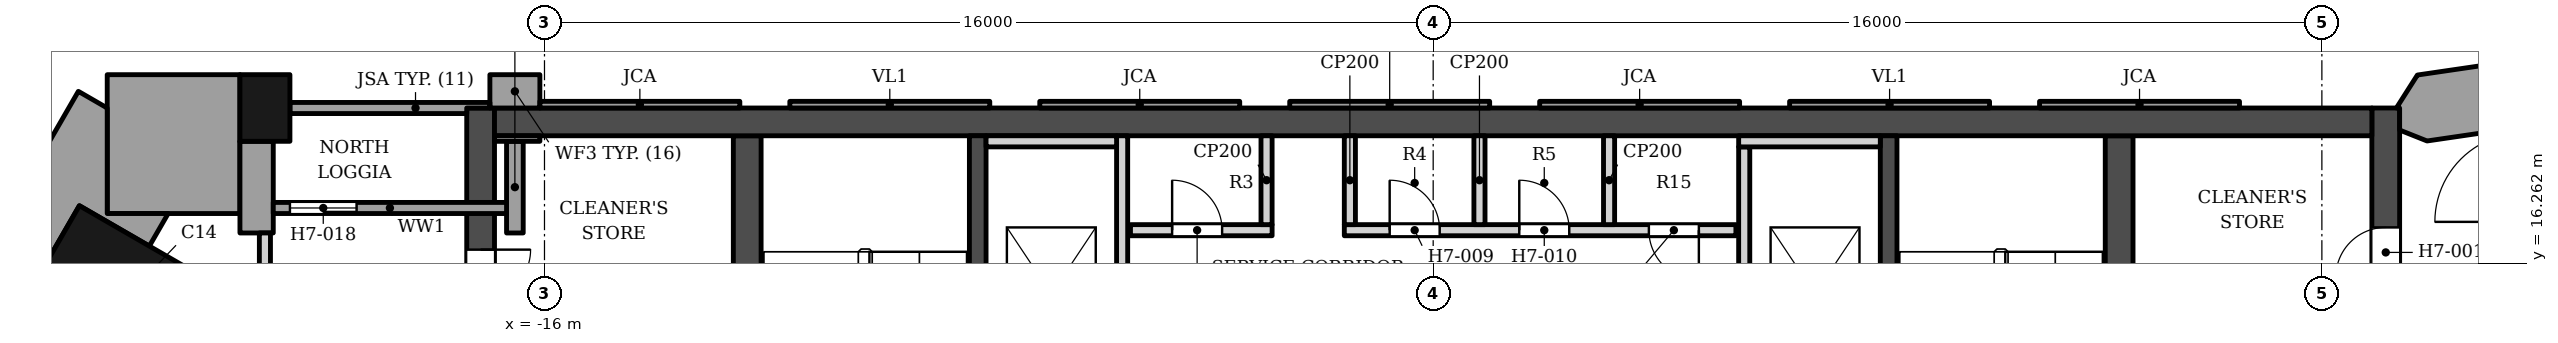
"""IFC4 building model, lengths in metres.
Left out: names, types, materials, properties, quantities, classifications, styles, units other than length and angle.
Written with IfcOpenShell. Run it as: python <this file> out.ifc"""

import sys

from ifc_helpers import new_model, si_unit, direction, frame, frame_2d, origin, origin_2d, place, context, subcontext, project, spatial, polyline, rectangle, outline, extrude, element, fill, save


model = new_model("IFC4")
c1 = context("Model", 3, precision=1e-05, world=origin(), true_north=direction((0.0, 1.0)))
c2 = subcontext(c1, "Body", "Model", "MODEL_VIEW")
j1 = project(units=[si_unit("LENGTHUNIT", "METRE"), si_unit("PLANEANGLEUNIT", "RADIAN")], contexts=[c1])
p1 = place(None, origin())
s1 = spatial("IfcSite", under=j1, at=p1, CompositionType="ELEMENT")
p2 = place(p1, origin())
s2 = spatial("IfcBuilding", under=s1, at=p2, CompositionType="ELEMENT")
p3 = place(p2, frame((0.0, 0.0, 112.2)))
s3 = spatial("IfcBuildingStorey", under=s2, at=p3, CompositionType="ELEMENT", Elevation=112.2)
p4 = place(p3, frame((-16.9, 18.802, 0.0), z_axis=(0.0, 0.0, 1.0), x_axis=(1.0, 0.0, 0.0)))
e1 = element("IfcWall", 1, at=p4, inside=s3, PredefinedType="SHEAR", context=c2, shape_type="SweptSolid", body=[
    extrude(rectangle(XDim=33.8, YDim=0.5, at=frame_2d((16.9, 0.0))), origin(), (0.0, 0.0, 1.0), 3.4),
])
p5 = place(p3, frame((-12.35, 5.253, 0.0), z_axis=(0.0, 0.0, 1.0), x_axis=(0.0, 1.0, 0.0)))
e2 = element("IfcWall", 2, at=p5, inside=s3, PredefinedType="SHEAR", context=c2, shape_type="SweptSolid", body=[
    extrude(rectangle(XDim=13.3, YDim=0.5, at=frame_2d((6.65, 0.0))), origin(), (0.0, 0.0, 1.0), 3.4),
])
p6 = place(p3, frame((-8.2, 5.253, 0.0), z_axis=(0.0, 0.0, 1.0), x_axis=(0.0, 1.0, 0.0)))
e3 = element("IfcWall", 3, at=p6, inside=s3, PredefinedType="SHEAR", context=c2, shape_type="SweptSolid", body=[
    extrude(rectangle(XDim=13.3, YDim=0.3, at=frame_2d((6.65, 0.0))), origin(), (0.0, 0.0, 1.0), 3.4),
])
p7 = place(p6, frame((7.1, 0.0, 0.0)))
e4 = element("IfcOpeningElement", 4, at=p7, cuts=e3, PredefinedType="OPENING", context=c2, shape_type="SweptSolid", body=[
    extrude(rectangle(XDim=1.4, YDim=2.1, at=frame_2d((0.7, 1.05))), frame((0.0, 0.16, 0.0), z_axis=(0.0, -1.0, 0.0), x_axis=(1.0, 0.0, 0.0)), (0.0, 0.0, 1.0), 0.32),
])
p8 = place(p6, frame((5.05, 0.0, 0.0)))
e5 = element("IfcOpeningElement", 5, at=p8, cuts=e3, PredefinedType="OPENING", context=c2, shape_type="SweptSolid", body=[
    extrude(rectangle(XDim=1.4, YDim=2.1, at=frame_2d((0.7, 1.05))), frame((0.0, 0.16, 0.0), z_axis=(0.0, -1.0, 0.0), x_axis=(1.0, 0.0, 0.0)), (0.0, 0.0, 1.0), 0.32),
])
p9 = place(p3, frame((12.35, 5.253, 0.0), z_axis=(0.0, 0.0, 1.0), x_axis=(0.0, 1.0, 0.0)))
e6 = element("IfcWall", 6, at=p9, inside=s3, PredefinedType="SHEAR", context=c2, shape_type="SweptSolid", body=[
    extrude(rectangle(XDim=13.3, YDim=0.5, at=frame_2d((6.65, 0.0))), origin(), (0.0, 0.0, 1.0), 3.4),
])
p10 = place(p3, frame((8.2, 5.253, 0.0), z_axis=(0.0, 0.0, 1.0), x_axis=(0.0, 1.0, 0.0)))
e7 = element("IfcWall", 7, at=p10, inside=s3, PredefinedType="SHEAR", context=c2, shape_type="SweptSolid", body=[
    extrude(rectangle(XDim=13.3, YDim=0.3, at=frame_2d((6.65, 0.0))), origin(), (0.0, 0.0, 1.0), 3.4),
])
p11 = place(p10, frame((7.1, 0.0, 0.0)))
e8 = element("IfcOpeningElement", 8, at=p11, cuts=e7, PredefinedType="OPENING", context=c2, shape_type="SweptSolid", body=[
    extrude(rectangle(XDim=1.4, YDim=2.1, at=frame_2d((0.7, 1.05))), frame((0.0, 0.16, 0.0), z_axis=(0.0, -1.0, 0.0), x_axis=(1.0, 0.0, 0.0)), (0.0, 0.0, 1.0), 0.32),
])
p12 = place(p10, frame((5.05, 0.0, 0.0)))
e9 = element("IfcOpeningElement", 9, at=p12, cuts=e7, PredefinedType="OPENING", context=c2, shape_type="SweptSolid", body=[
    extrude(rectangle(XDim=1.4, YDim=2.1, at=frame_2d((0.7, 1.05))), frame((0.0, 0.16, 0.0), z_axis=(0.0, -1.0, 0.0), x_axis=(1.0, 0.0, 0.0)), (0.0, 0.0, 1.0), 0.32),
])
p13 = place(p3, frame((-17.15, 5.853, 0.0), z_axis=(0.0, 0.0, 1.0), x_axis=(0.0, 1.0, 0.0)))
e10 = element("IfcWall", 10, at=p13, inside=s3, PredefinedType="SHEAR", context=c2, shape_type="SweptSolid", body=[
    extrude(rectangle(XDim=13.2, YDim=0.5, at=frame_2d((6.6, 0.0))), origin(), (0.0, 0.0, 1.0), 3.4),
])
p14 = place(p13, frame((4.1, 0.0, 0.0)))
e11 = element("IfcOpeningElement", 11, at=p14, cuts=e10, PredefinedType="OPENING", context=c2, shape_type="SweptSolid", body=[
    extrude(rectangle(XDim=1.6, YDim=2.1, at=frame_2d((0.8, 1.05))), frame((0.0, 0.26, 0.0), z_axis=(0.0, -1.0, 0.0), x_axis=(1.0, 0.0, 0.0)), (0.0, 0.0, 1.0), 0.52),
])
p15 = place(p13, frame((9.75, 0.0, 0.0)))
e12 = element("IfcOpeningElement", 12, at=p15, cuts=e10, PredefinedType="OPENING", context=c2, shape_type="SweptSolid", body=[
    extrude(rectangle(XDim=0.9, YDim=2.1, at=frame_2d((0.45, 1.05))), frame((0.0, 0.26, 0.0), z_axis=(0.0, -1.0, 0.0), x_axis=(1.0, 0.0, 0.0)), (0.0, 0.0, 1.0), 0.52),
])
p16 = place(p3, frame((17.15, 5.853, 0.0), z_axis=(0.0, 0.0, 1.0), x_axis=(0.0, 1.0, 0.0)))
e13 = element("IfcWall", 13, at=p16, inside=s3, PredefinedType="SHEAR", context=c2, shape_type="SweptSolid", body=[
    extrude(rectangle(XDim=13.2, YDim=0.5, at=frame_2d((6.6, 0.0))), origin(), (0.0, 0.0, 1.0), 3.4),
])
p17 = place(p16, frame((4.1, 0.0, 0.0)))
e14 = element("IfcOpeningElement", 14, at=p17, cuts=e13, PredefinedType="OPENING", context=c2, shape_type="SweptSolid", body=[
    extrude(rectangle(XDim=1.6, YDim=2.1, at=frame_2d((0.8, 1.05))), frame((0.0, 0.26, 0.0), z_axis=(0.0, -1.0, 0.0), x_axis=(1.0, 0.0, 0.0)), (0.0, 0.0, 1.0), 0.52),
])
p18 = place(p16, frame((10.15, 0.0, 0.0)))
e15 = element("IfcOpeningElement", 15, at=p18, cuts=e13, PredefinedType="OPENING", context=c2, shape_type="SweptSolid", body=[
    extrude(rectangle(XDim=0.9, YDim=2.1, at=frame_2d((0.45, 1.05))), frame((0.0, 0.26, 0.0), z_axis=(0.0, -1.0, 0.0), x_axis=(1.0, 0.0, 0.0)), (0.0, 0.0, 1.0), 0.52),
])
p19 = place(p3, frame((-23.843, 15.313, 0.0), z_axis=(0.0, 0.0, 1.0), x_axis=(0.866025377604, -0.500000045345, 0.0)))
e16 = element("IfcColumn", 16, at=p19, inside=s3, PredefinedType="COLUMN", context=c2, shape_type="SweptSolid", body=[
    extrude(rectangle(XDim=2.9, YDim=2.9, at=origin_2d()), origin(), (0.0, 0.0, 1.0), 3.4),
])
p20 = place(p3, frame((-21.033, 19.053, 0.0), z_axis=(0.0, 0.0, 1.0), x_axis=(-1.0, 0.0, 0.0)))
e17 = element("IfcColumn", 17, at=p20, inside=s3, PredefinedType="COLUMN", context=c2, shape_type="SweptSolid", body=[
    extrude(rectangle(XDim=0.9, YDim=1.2, at=origin_2d()), origin(), (0.0, 0.0, 1.0), 3.4),
])
p21 = place(p3, origin())
e18 = element("IfcWall", 18, at=p21, inside=s3, PredefinedType="SOLIDWALL", context=c2, shape_type="SweptSolid", body=[
    extrude(outline(polyline([(-16.083, 19.052), (-16.083, 19.653), (-16.983, 19.653), (-16.983, 19.052), (-16.083, 19.052)])), origin(), (0.0, 0.0, 1.0), 2.65),
])
p22 = place(p3, origin())
e19 = element("IfcWall", 19, at=p22, inside=s3, PredefinedType="SOLIDWALL", context=c2, shape_type="SweptSolid", body=[
    extrude(outline(polyline([(-16.083, 18.453), (-16.083, 18.552), (-16.9, 18.552), (-16.9, 18.453), (-16.083, 18.453)])), origin(), (0.0, 0.0, 1.0), 2.65),
])
p23 = place(p3, origin())
e20 = element("IfcWall", 20, at=p23, inside=s3, PredefinedType="SOLIDWALL", context=c2, shape_type="SweptSolid", body=[
    extrude(outline(polyline([(-16.383, 16.802), (-16.383, 18.453), (-16.683, 18.453), (-16.683, 16.802), (-16.383, 16.802)])), origin(), (0.0, 0.0, 1.0), 2.65),
])
p24 = place(p3, origin())
e21 = element("IfcWall", 21, at=p24, inside=s3, PredefinedType="SOLIDWALL", context=c2, shape_type="SweptSolid", body=[
    extrude(outline(polyline([(-21.483, 18.453), (-21.483, 16.802), (-20.883, 16.802), (-20.883, 18.453), (-21.483, 18.453)])), origin(), (0.0, 0.0, 1.0), 2.63),
])
p25 = place(p3, origin())
e22 = element("IfcWall", 22, at=p25, inside=s3, PredefinedType="SOLIDWALL", context=c2, shape_type="SweptSolid", body=[
    extrude(outline(polyline([(10.917, 19.173), (10.917, 19.052), (14.517, 19.052), (14.517, 19.173), (10.917, 19.173)])), origin(), (0.0, 0.0, 1.0), 2.65),
])
p26 = place(p3, origin())
e23 = element("IfcWall", 23, at=p26, inside=s3, PredefinedType="ELEMENTEDWALL", context=c2, shape_type="SweptSolid", body=[
    extrude(outline(polyline([(6.417, 19.173), (6.417, 19.052), (10.017, 19.052), (10.017, 19.173), (6.417, 19.173)])), origin(), (0.0, 0.0, 1.0), 2.65),
])
p27 = place(p3, origin())
e24 = element("IfcWall", 24, at=p27, inside=s3, PredefinedType="SOLIDWALL", context=c2, shape_type="SweptSolid", body=[
    extrude(outline(polyline([(1.917, 19.173), (1.917, 19.052), (5.517, 19.052), (5.517, 19.173), (1.917, 19.173)])), origin(), (0.0, 0.0, 1.0), 2.65),
])
p28 = place(p3, origin())
e25 = element("IfcWall", 25, at=p28, inside=s3, PredefinedType="ELEMENTEDWALL", context=c2, shape_type="SweptSolid", body=[
    extrude(outline(polyline([(-2.583, 19.173), (-2.583, 19.052), (1.017, 19.052), (1.017, 19.173), (-2.583, 19.173)])), origin(), (0.0, 0.0, 1.0), 2.65),
])
p29 = place(p3, origin())
e26 = element("IfcWall", 26, at=p29, inside=s3, PredefinedType="SOLIDWALL", context=c2, shape_type="SweptSolid", body=[
    extrude(outline(polyline([(-7.083, 19.173), (-7.083, 19.052), (-3.483, 19.052), (-3.483, 19.173), (-7.083, 19.173)])), origin(), (0.0, 0.0, 1.0), 2.65),
])
p30 = place(p3, origin())
e27 = element("IfcWall", 27, at=p30, inside=s3, PredefinedType="ELEMENTEDWALL", context=c2, shape_type="SweptSolid", body=[
    extrude(outline(polyline([(-11.583, 19.173), (-11.583, 19.052), (-7.983, 19.052), (-7.983, 19.173), (-11.583, 19.173)])), origin(), (0.0, 0.0, 1.0), 2.65),
])
p31 = place(p3, origin())
e28 = element("IfcWall", 28, at=p31, inside=s3, PredefinedType="SOLIDWALL", context=c2, shape_type="SweptSolid", body=[
    extrude(outline(polyline([(-16.083, 19.173), (-16.083, 19.052), (-12.483, 19.052), (-12.483, 19.173), (-16.083, 19.173)])), origin(), (0.0, 0.0, 1.0), 2.65),
])
p32 = place(p3, origin())
e29 = element("IfcWall", 29, at=p32, inside=s3, PredefinedType="SOLIDWALL", context=c2, shape_type="SweptSolid", body=[
    extrude(outline(polyline([(-20.583, 19.153), (-20.583, 18.953), (-17.4, 18.953), (-17.4, 19.052), (-16.983, 19.052), (-16.983, 19.153), (-20.583, 19.153)])), origin(), (0.0, 0.0, 1.0), 2.65),
])
p33 = place(p3, frame((-16.683, 17.252, 0.0), z_axis=(0.0, 0.0, 1.0), x_axis=(-1.0, 0.0, 0.0)))
e30 = element("IfcWall", 30, at=p33, inside=s3, PredefinedType="ELEMENTEDWALL", context=c2, shape_type="SweptSolid", body=[
    extrude(rectangle(XDim=4.2, YDim=0.2, at=frame_2d((2.1, 0.0))), origin(), (0.0, 0.0, 1.0), 2.65),
])
p34 = place(p33, frame((2.7, 0.0, 0.0)))
e31 = element("IfcOpeningElement", 31, at=p34, cuts=e30, PredefinedType="OPENING", context=c2, shape_type="SweptSolid", body=[
    extrude(rectangle(XDim=1.2, YDim=2.4, at=frame_2d((0.6, 1.2))), frame((0.0, 0.11, 0.0), z_axis=(0.0, -1.0, 0.0), x_axis=(1.0, 0.0, 0.0)), (0.0, 0.0, 1.0), 0.22),
])
p35 = place(p3, origin())
e32 = element("IfcWall", 32, at=p35, inside=s3, PredefinedType="SOLIDWALL", context=c2, shape_type="SweptSolid", body=[
    extrude(outline(polyline([(-23.873, 17.153), (-21.483, 17.153), (-21.483, 18.453), (-21.483, 18.453), (-21.483, 19.653), (-23.873, 19.653), (-23.873, 17.153)])), origin(), (0.0, 0.0, 1.0), 2.63),
])
p36 = place(p3, origin())
e33 = element("IfcWall", 33, at=p36, inside=s3, PredefinedType="SOLIDWALL", context=c2, shape_type="SweptSolid", body=[
    extrude(outline(polyline([(-23.114, 16.566), (-22.776, 17.153), (-23.873, 17.153), (-23.873, 19.052), (-24.392, 19.353), (-27.616, 13.768), (-25.451, 12.518), (-24.564, 14.055), (-25.824, 14.782), (-24.374, 17.294), (-23.114, 16.566)])), origin(), (0.0, 0.0, 1.0), 2.63),
])
p37 = place(p3, origin())
e34 = element("IfcWall", 34, at=p37, inside=s3, PredefinedType="SOLIDWALL", context=c2, shape_type="SweptSolid", body=[
    extrude(outline(polyline([(17.72, 19.646), (17.342, 19.052), (17.4, 19.052), (17.4, 18.656), (17.894, 18.459), (19.261, 18.659), (19.087, 19.847), (17.72, 19.646)])), origin(), (0.0, 0.0, 1.0), 2.65),
])
p38 = place(p3, frame((-5.6, 14.253, 0.0), z_axis=(0.0, 0.0, 1.0), x_axis=(0.0, 1.0, 0.0)))
e35 = element("IfcWall", 35, at=p38, inside=s3, PredefinedType="SOLIDWALL", context=c2, shape_type="SweptSolid", body=[
    extrude(rectangle(XDim=4.3, YDim=0.2, at=frame_2d((2.15, 0.0))), origin(), (0.0, 0.0, 1.0), 3.23),
])
p39 = place(p3, frame((5.6, 15.453, 0.0), z_axis=(0.0, 0.0, 1.0), x_axis=(0.0, 1.0, 0.0)))
e36 = element("IfcWall", 36, at=p39, inside=s3, PredefinedType="SOLIDWALL", context=c2, shape_type="SweptSolid", body=[
    extrude(rectangle(XDim=2.9, YDim=0.2, at=frame_2d((1.45, 0.0))), origin(), (0.0, 0.0, 1.0), 3.23),
])
p40 = place(p3, frame((-5.45, 16.853, 0.0), z_axis=(0.0, 0.0, 1.0), x_axis=(1.0, 0.0, 0.0)))
e37 = element("IfcWall", 37, at=p40, inside=s3, PredefinedType="SOLIDWALL", context=c2, shape_type="SweptSolid", body=[
    extrude(rectangle(XDim=2.55, YDim=0.2, at=frame_2d((1.275, 0.0))), origin(), (0.0, 0.0, 1.0), 3.23),
])
p41 = place(p40, frame((0.75, 0.0, 0.0)))
e38 = element("IfcOpeningElement", 38, at=p41, cuts=e37, PredefinedType="OPENING", context=c2, shape_type="SweptSolid", body=[
    extrude(rectangle(XDim=0.9, YDim=2.1, at=frame_2d((0.45, 1.05))), frame((0.0, 0.11, 0.0), z_axis=(0.0, -1.0, 0.0), x_axis=(1.0, 0.0, 0.0)), (0.0, 0.0, 1.0), 0.22),
])
p42 = place(p3, frame((-1.6, 16.853, 0.0), z_axis=(0.0, 0.0, 1.0), x_axis=(1.0, 0.0, 0.0)))
e39 = element("IfcWall", 39, at=p42, inside=s3, PredefinedType="SOLIDWALL", context=c2, shape_type="SweptSolid", body=[
    extrude(rectangle(XDim=7.05, YDim=0.2, at=frame_2d((3.525, 0.0))), origin(), (0.0, 0.0, 1.0), 3.23),
])
p43 = place(p42, frame((0.817, 0.0, 0.0)))
e40 = element("IfcOpeningElement", 40, at=p43, cuts=e39, PredefinedType="OPENING", context=c2, shape_type="SweptSolid", body=[
    extrude(rectangle(XDim=0.9, YDim=2.1, at=frame_2d((0.45, 1.05))), frame((0.0, 0.11, 0.0), z_axis=(0.0, -1.0, 0.0), x_axis=(1.0, 0.0, 0.0)), (0.0, 0.0, 1.0), 0.22),
])
p44 = place(p42, frame((3.15, 0.0, 0.0)))
e41 = element("IfcOpeningElement", 41, at=p44, cuts=e39, PredefinedType="OPENING", context=c2, shape_type="SweptSolid", body=[
    extrude(rectangle(XDim=0.9, YDim=2.1, at=frame_2d((0.45, 1.05))), frame((0.0, 0.11, 0.0), z_axis=(0.0, -1.0, 0.0), x_axis=(1.0, 0.0, 0.0)), (0.0, 0.0, 1.0), 0.22),
])
p45 = place(p42, frame((5.483, 0.0, 0.0)))
e42 = element("IfcOpeningElement", 42, at=p45, cuts=e39, PredefinedType="OPENING", context=c2, shape_type="SweptSolid", body=[
    extrude(rectangle(XDim=0.9, YDim=2.1, at=frame_2d((0.45, 1.05))), frame((0.0, 0.11, 0.0), z_axis=(0.0, -1.0, 0.0), x_axis=(1.0, 0.0, 0.0)), (0.0, 0.0, 1.0), 0.22),
])
for number, where, z_axis, x_axis in (
    (43, (-3.0, 16.953, 0.0), (0.0, 0.0, 1.0), (0.0, 1.0, 0.0)),
    (44, (-1.5, 16.953, 0.0), (0.0, 0.0, 1.0), (0.0, 1.0, 0.0)),
    (45, (0.833, 16.953, 0.0), (0.0, 0.0, 1.0), (0.0, 1.0, 0.0)),
    (46, (3.167, 16.953, 0.0), (0.0, 0.0, 1.0), (0.0, 1.0, 0.0)),
):
    element("IfcWall", number, at=place(p3, frame(where, z_axis=z_axis, x_axis=x_axis)), inside=s3, PredefinedType="PARTITIONING", context=c2, shape_type="SweptSolid", body=[
        extrude(rectangle(XDim=1.6, YDim=0.2, at=frame_2d((0.8, 0.0))), origin(), (0.0, 0.0, 1.0), 3.23),
    ])
p46 = place(p3, frame((-8.05, 18.453, 0.0), z_axis=(0.0, 0.0, 1.0), x_axis=(1.0, 0.0, 0.0)))
e47 = element("IfcWall", 47, at=p46, inside=s3, PredefinedType="SOLIDWALL", context=c2, shape_type="SweptSolid", body=[
    extrude(rectangle(XDim=2.35, YDim=0.2, at=frame_2d((1.175, 0.0))), origin(), (0.0, 0.0, 1.0), 3.23),
])
p47 = place(p3, frame((5.5, 18.453, 0.0), z_axis=(0.0, 0.0, 1.0), x_axis=(1.0, 0.0, 0.0)))
e48 = element("IfcWall", 48, at=p47, inside=s3, PredefinedType="SOLIDWALL", context=c2, shape_type="SweptSolid", body=[
    extrude(rectangle(XDim=2.55, YDim=0.2, at=frame_2d((1.275, 0.0))), origin(), (0.0, 0.0, 1.0), 3.23),
])
p48 = place(p3, frame((-21.033, 16.802, 0.0), z_axis=(0.0, 0.0, 1.0), x_axis=(0.0, -1.0, 0.0)))
e49 = element("IfcWall", 49, at=p48, inside=s3, PredefinedType="PARTITIONING", context=c2, shape_type="SweptSolid", body=[
    extrude(rectangle(XDim=1.55, YDim=0.2, at=frame_2d((0.775, 0.0))), origin(), (0.0, 0.0, 1.0), 3.23),
])
p49 = place(p34, origin())
e50 = element("IfcDoor", 50, at=p49, inside=s3, OperationType="SINGLE_SWING_LEFT", PredefinedType="DOOR", context=c2, shape_type="SweptSolid", body=[
    extrude(rectangle(XDim=1.2, YDim=2.4, at=frame_2d((0.6, 1.2))), frame((0.0, 0.025, 0.0), z_axis=(0.0, -1.0, 0.0), x_axis=(1.0, 0.0, 0.0)), (0.0, 0.0, 1.0), 0.05),
])
fill(e31, e50)
p50 = place(p41, origin())
e51 = element("IfcDoor", 51, at=p50, inside=s3, OperationType="SINGLE_SWING_LEFT", PredefinedType="DOOR", context=c2, shape_type="SweptSolid", body=[
    extrude(rectangle(XDim=0.9, YDim=2.1, at=frame_2d((0.45, 1.05))), frame((0.0, 0.025, 0.0), z_axis=(0.0, -1.0, 0.0), x_axis=(1.0, 0.0, 0.0)), (0.0, 0.0, 1.0), 0.05),
])
fill(e38, e51)
p51 = place(p43, origin())
e52 = element("IfcDoor", 52, at=p51, inside=s3, OperationType="SINGLE_SWING_LEFT", PredefinedType="DOOR", context=c2, shape_type="SweptSolid", body=[
    extrude(rectangle(XDim=0.9, YDim=2.1, at=frame_2d((0.45, 1.05))), frame((0.0, 0.025, 0.0), z_axis=(0.0, -1.0, 0.0), x_axis=(1.0, 0.0, 0.0)), (0.0, 0.0, 1.0), 0.05),
])
fill(e40, e52)
p52 = place(p44, origin())
e53 = element("IfcDoor", 53, at=p52, inside=s3, OperationType="SINGLE_SWING_LEFT", PredefinedType="DOOR", context=c2, shape_type="SweptSolid", body=[
    extrude(rectangle(XDim=0.9, YDim=2.1, at=frame_2d((0.45, 1.05))), frame((0.0, 0.025, 0.0), z_axis=(0.0, -1.0, 0.0), x_axis=(1.0, 0.0, 0.0)), (0.0, 0.0, 1.0), 0.05),
])
fill(e41, e53)
p53 = place(p45, origin())
e54 = element("IfcDoor", 54, at=p53, inside=s3, OperationType="SINGLE_SWING_RIGHT", PredefinedType="DOOR", context=c2, shape_type="SweptSolid", body=[
    extrude(rectangle(XDim=0.9, YDim=2.1, at=frame_2d((0.45, 1.05))), frame((0.0, 0.025, 0.0), z_axis=(0.0, -1.0, 0.0), x_axis=(1.0, 0.0, 0.0)), (0.0, 0.0, 1.0), 0.05),
])
fill(e42, e54)
p54 = place(p15, origin())
e55 = element("IfcDoor", 55, at=p54, inside=s3, OperationType="SINGLE_SWING_RIGHT", PredefinedType="DOOR", context=c2, shape_type="SweptSolid", body=[
    extrude(rectangle(XDim=0.9, YDim=2.1, at=frame_2d((0.45, 1.05))), frame((0.0, 0.025, 0.0), z_axis=(0.0, -1.0, 0.0), x_axis=(1.0, 0.0, 0.0)), (0.0, 0.0, 1.0), 0.05),
])
fill(e12, e55)
p55 = place(p18, origin())
e56 = element("IfcDoor", 56, at=p55, inside=s3, OperationType="SINGLE_SWING_LEFT", PredefinedType="DOOR", context=c2, shape_type="SweptSolid", body=[
    extrude(rectangle(XDim=0.9, YDim=2.1, at=frame_2d((0.45, 1.05))), frame((0.0, 0.025, 0.0), z_axis=(0.0, -1.0, 0.0), x_axis=(1.0, 0.0, 0.0)), (0.0, 0.0, 1.0), 0.05),
])
fill(e15, e56)
save(model, sys.argv[1])
